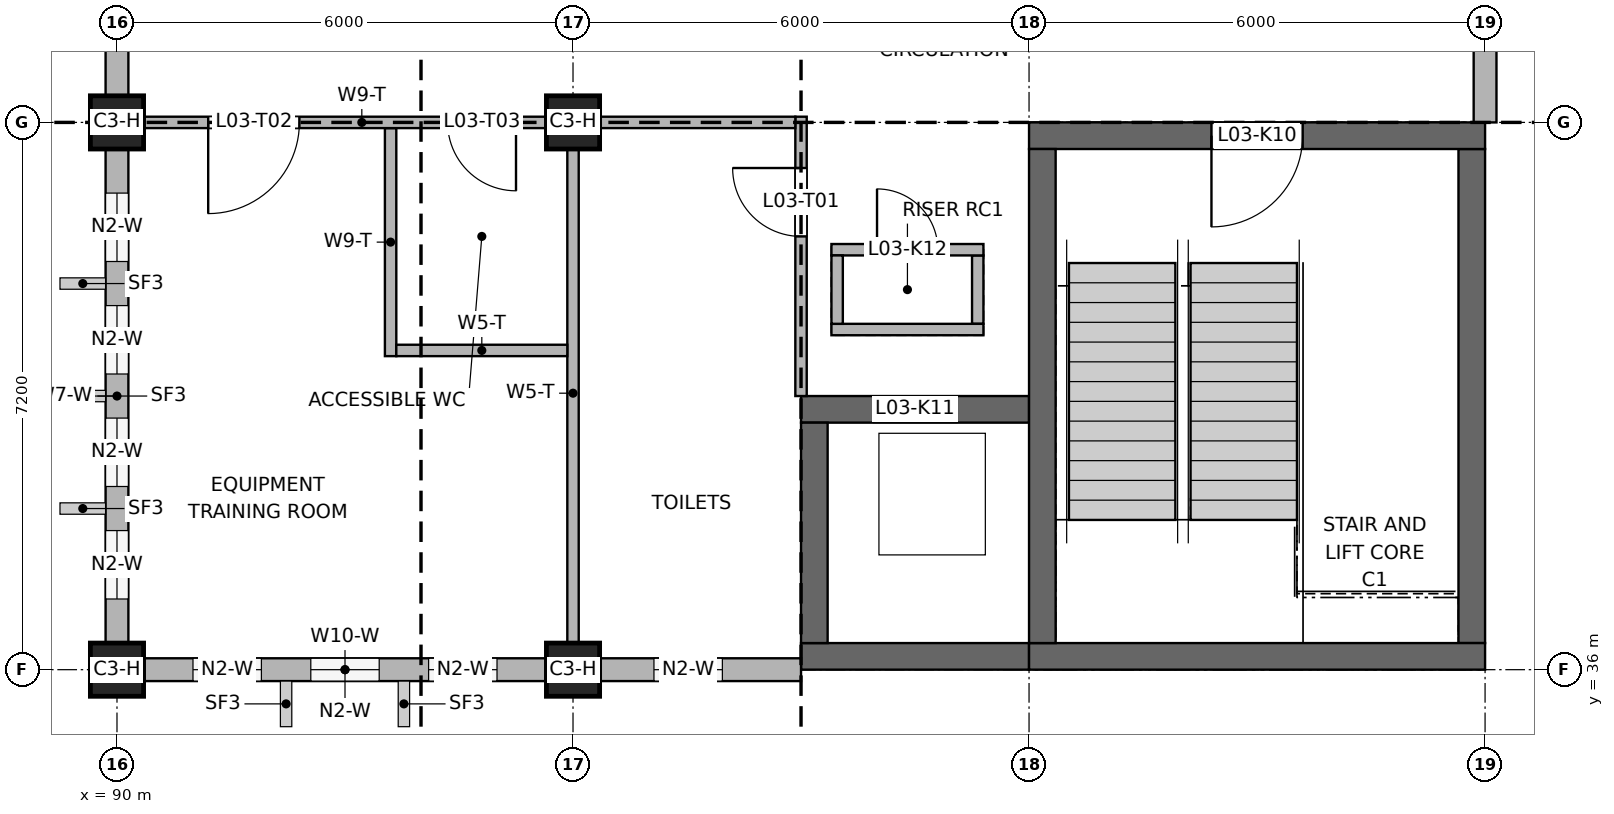
"""IFC4 building model, lengths in metres.
Left out: names, types, materials, properties, quantities, classifications, styles, units other than length and angle.
Written with IfcOpenShell. Run it as: python <this file> out.ifc"""

import sys

from ifc_helpers import new_model, si_unit, direction, frame, frame_2d, origin, origin_2d, place, context, subcontext, project, spatial, rectangle, extrude, element, fill, save


model = new_model("IFC4")
c1 = context("Model", 3, precision=1e-05, world=origin(), true_north=direction((0.0, 1.0)))
c2 = subcontext(c1, "Body", "Model", "MODEL_VIEW")
j1 = project(units=[si_unit("LENGTHUNIT", "METRE"), si_unit("PLANEANGLEUNIT", "RADIAN")], contexts=[c1])
p1 = place(None, origin())
s1 = spatial("IfcSite", under=j1, at=p1, CompositionType="ELEMENT")
p2 = place(p1, origin())
s2 = spatial("IfcBuilding", under=s1, at=p2, CompositionType="ELEMENT")
p3 = place(p2, frame((0.0, 0.0, 12.6)))
s3 = spatial("IfcBuildingStorey", under=s2, at=p3, CompositionType="ELEMENT", Elevation=12.6)
p4 = place(p3, frame((102.0, 36.175, 0.0), z_axis=(0.0, 0.0, 1.0), x_axis=(1.0, 0.0, 0.0)))
e1 = element("IfcWall", 1, at=p4, inside=s3, PredefinedType="SHEAR", context=c2, shape_type="SweptSolid", body=[
    extrude(rectangle(XDim=6.0, YDim=0.35, at=frame_2d((3.0, 0.0))), origin(), (0.0, 0.0, 1.0), 4.0),
])
p5 = place(p3, frame((102.0, 43.025, 0.0), z_axis=(0.0, 0.0, 1.0), x_axis=(1.0, 0.0, 0.0)))
e2 = element("IfcWall", 2, at=p5, inside=s3, PredefinedType="SHEAR", context=c2, shape_type="SweptSolid", body=[
    extrude(rectangle(XDim=6.0, YDim=0.35, at=frame_2d((3.0, 0.0))), origin(), (0.0, 0.0, 1.0), 4.0),
])
p6 = place(p5, frame((2.4, 0.0, 0.0)))
e3 = element("IfcOpeningElement", 3, at=p6, cuts=e2, PredefinedType="OPENING", context=c2, shape_type="SweptSolid", body=[
    extrude(rectangle(XDim=1.2, YDim=2.1, at=frame_2d((0.6, 1.05))), frame((0.0, 0.185, 0.0), z_axis=(0.0, -1.0, 0.0), x_axis=(1.0, 0.0, 0.0)), (0.0, 0.0, 1.0), 0.37),
])
for number, where, z_axis, x_axis in (
    (4, (102.175, 36.35, 0.0), (0.0, 0.0, 1.0), (0.0, 1.0, 0.0)),
    (5, (107.825, 36.35, 0.0), (0.0, 0.0, 1.0), (0.0, 1.0, 0.0)),
):
    element("IfcWall", number, at=place(p3, frame(where, z_axis=z_axis, x_axis=x_axis)), inside=s3, PredefinedType="SHEAR", context=c2, shape_type="SweptSolid", body=[
        extrude(rectangle(XDim=6.5, YDim=0.35, at=frame_2d((3.25, 0.0))), origin(), (0.0, 0.0, 1.0), 4.0),
    ])
p7 = place(p3, frame((99.0, 36.175, 0.0), z_axis=(0.0, 0.0, 1.0), x_axis=(1.0, 0.0, 0.0)))
e6 = element("IfcWall", 6, at=p7, inside=s3, PredefinedType="SHEAR", context=c2, shape_type="SweptSolid", body=[
    extrude(rectangle(XDim=3.0, YDim=0.35, at=frame_2d((1.5, 0.0))), origin(), (0.0, 0.0, 1.0), 4.2),
])
p8 = place(p3, frame((99.0, 39.425, 0.0), z_axis=(0.0, 0.0, 1.0), x_axis=(1.0, 0.0, 0.0)))
e7 = element("IfcWall", 7, at=p8, inside=s3, PredefinedType="SHEAR", context=c2, shape_type="SweptSolid", body=[
    extrude(rectangle(XDim=3.0, YDim=0.35, at=frame_2d((1.5, 0.0))), origin(), (0.0, 0.0, 1.0), 4.2),
])
p9 = place(p8, frame((0.95, 0.0, 0.0)))
e8 = element("IfcOpeningElement", 8, at=p9, cuts=e7, PredefinedType="OPENING", context=c2, shape_type="SweptSolid", body=[
    extrude(rectangle(XDim=1.1, YDim=2.1, at=frame_2d((0.55, 1.05))), frame((0.0, 0.185, 0.0), z_axis=(0.0, -1.0, 0.0), x_axis=(1.0, 0.0, 0.0)), (0.0, 0.0, 1.0), 0.37),
])
p10 = place(p3, frame((99.175, 36.35, 0.0), z_axis=(0.0, 0.0, 1.0), x_axis=(0.0, 1.0, 0.0)))
e9 = element("IfcWall", 9, at=p10, inside=s3, PredefinedType="SHEAR", context=c2, shape_type="SweptSolid", body=[
    extrude(rectangle(XDim=2.9, YDim=0.35, at=frame_2d((1.45, 0.0))), origin(), (0.0, 0.0, 1.0), 4.2),
])
p11 = place(p3, frame((99.4, 40.475, 0.0), z_axis=(0.0, 0.0, 1.0), x_axis=(1.0, 0.0, 0.0)))
e10 = element("IfcWall", 10, at=p11, inside=s3, PredefinedType="SOLIDWALL", context=c2, shape_type="SweptSolid", body=[
    extrude(rectangle(XDim=2.0, YDim=0.15, at=frame_2d((1.0, 0.0))), origin(), (0.0, 0.0, 1.0), 4.2),
])
p12 = place(p3, frame((99.4, 41.525, 0.0), z_axis=(0.0, 0.0, 1.0), x_axis=(1.0, 0.0, 0.0)))
e11 = element("IfcWall", 11, at=p12, inside=s3, PredefinedType="SOLIDWALL", context=c2, shape_type="SweptSolid", body=[
    extrude(rectangle(XDim=2.0, YDim=0.15, at=frame_2d((1.0, 0.0))), origin(), (0.0, 0.0, 1.0), 4.2),
])
p13 = place(p12, frame((0.6, 0.0, 0.0)))
e12 = element("IfcOpeningElement", 12, at=p13, cuts=e11, PredefinedType="OPENING", context=c2, shape_type="SweptSolid", body=[
    extrude(rectangle(XDim=0.8, YDim=2.1, at=frame_2d((0.4, 1.05))), frame((0.0, 0.085, 0.0), z_axis=(0.0, -1.0, 0.0), x_axis=(1.0, 0.0, 0.0)), (0.0, 0.0, 1.0), 0.17),
])
for number, where, z_axis, x_axis in (
    (13, (99.475, 40.55, 0.0), (0.0, 0.0, 1.0), (0.0, 1.0, 0.0)),
    (14, (101.325, 40.55, 0.0), (0.0, 0.0, 1.0), (0.0, 1.0, 0.0)),
):
    element("IfcWall", number, at=place(p3, frame(where, z_axis=z_axis, x_axis=x_axis)), inside=s3, PredefinedType="SOLIDWALL", context=c2, shape_type="SweptSolid", body=[
        extrude(rectangle(XDim=0.9, YDim=0.15, at=frame_2d((0.45, 0.0))), origin(), (0.0, 0.0, 1.0), 4.2),
    ])
for number, where, z_axis, x_axis in (
    (15, (90.0, 36.0, 0.0), (0.0, 0.0, 1.0), (1.0, 0.0, 0.0)),
    (16, (96.0, 36.0, 0.0), (0.0, 0.0, 1.0), (1.0, 0.0, 0.0)),
    (17, (90.0, 43.2, 0.0), (0.0, 0.0, 1.0), (1.0, 0.0, 0.0)),
    (18, (96.0, 43.2, 0.0), (0.0, 0.0, 1.0), (1.0, 0.0, 0.0)),
):
    element("IfcColumn", number, at=place(p3, frame(where, z_axis=z_axis, x_axis=x_axis)), inside=s3, PredefinedType="COLUMN", context=c2, shape_type="SweptSolid", body=[
        extrude(rectangle(XDim=0.7, YDim=0.7, at=origin_2d()), origin(), (0.0, 0.0, 1.0), 4.0),
    ])
p14 = place(p3, frame((90.0, 36.35, 0.0), z_axis=(0.0, 0.0, 1.0), x_axis=(0.0, 1.0, 0.0)))
e19 = element("IfcWall", 19, at=p14, inside=s3, PredefinedType="SOLIDWALL", context=c2, shape_type="SweptSolid", body=[
    extrude(rectangle(XDim=6.5, YDim=0.3, at=frame_2d((3.25, 0.0))), origin(), (0.0, 0.0, 1.0), 3.2),
])
p15 = place(p14, frame((0.58, 0.0, 0.9)))
e20 = element("IfcOpeningElement", 20, at=p15, cuts=e19, PredefinedType="OPENING", context=c2, shape_type="SweptSolid", body=[
    extrude(rectangle(XDim=0.9, YDim=1.2, at=frame_2d((0.45, 0.6))), frame((0.0, 0.16, 0.0), z_axis=(0.0, -1.0, 0.0), x_axis=(1.0, 0.0, 0.0)), (0.0, 0.0, 1.0), 0.32),
])
p16 = place(p14, frame((2.06, 0.0, 0.9)))
e21 = element("IfcOpeningElement", 21, at=p16, cuts=e19, PredefinedType="OPENING", context=c2, shape_type="SweptSolid", body=[
    extrude(rectangle(XDim=0.9, YDim=1.2, at=frame_2d((0.45, 0.6))), frame((0.0, 0.16, 0.0), z_axis=(0.0, -1.0, 0.0), x_axis=(1.0, 0.0, 0.0)), (0.0, 0.0, 1.0), 0.32),
])
p17 = place(p14, frame((3.54, 0.0, 0.9)))
e22 = element("IfcOpeningElement", 22, at=p17, cuts=e19, PredefinedType="OPENING", context=c2, shape_type="SweptSolid", body=[
    extrude(rectangle(XDim=0.9, YDim=1.2, at=frame_2d((0.45, 0.6))), frame((0.0, 0.16, 0.0), z_axis=(0.0, -1.0, 0.0), x_axis=(1.0, 0.0, 0.0)), (0.0, 0.0, 1.0), 0.32),
])
p18 = place(p14, frame((5.02, 0.0, 0.9)))
e23 = element("IfcOpeningElement", 23, at=p18, cuts=e19, PredefinedType="OPENING", context=c2, shape_type="SweptSolid", body=[
    extrude(rectangle(XDim=0.9, YDim=1.2, at=frame_2d((0.45, 0.6))), frame((0.0, 0.16, 0.0), z_axis=(0.0, -1.0, 0.0), x_axis=(1.0, 0.0, 0.0)), (0.0, 0.0, 1.0), 0.32),
])
p19 = place(p3, frame((90.0, 43.55, 0.0), z_axis=(0.0, 0.0, 1.0), x_axis=(0.0, 1.0, 0.0)))
e24 = element("IfcWall", 24, at=p19, inside=s3, PredefinedType="SOLIDWALL", context=c2, shape_type="SweptSolid", body=[
    extrude(rectangle(XDim=6.85, YDim=0.3, at=frame_2d((3.425, 0.0))), origin(), (0.0, 0.0, 1.0), 3.1),
])
p20 = place(p19, frame((2.143, 0.0, 0.9)))
e25 = element("IfcOpeningElement", 25, at=p20, cuts=e24, PredefinedType="OPENING", context=c2, shape_type="SweptSolid", body=[
    extrude(rectangle(XDim=0.9, YDim=1.2, at=frame_2d((0.45, 0.6))), frame((0.0, 0.16, 0.0), z_axis=(0.0, -1.0, 0.0), x_axis=(1.0, 0.0, 0.0)), (0.0, 0.0, 1.0), 0.32),
])
p21 = place(p19, frame((3.457, 0.0, 0.9)))
e26 = element("IfcOpeningElement", 26, at=p21, cuts=e24, PredefinedType="OPENING", context=c2, shape_type="SweptSolid", body=[
    extrude(rectangle(XDim=0.9, YDim=1.2, at=frame_2d((0.45, 0.6))), frame((0.0, 0.16, 0.0), z_axis=(0.0, -1.0, 0.0), x_axis=(1.0, 0.0, 0.0)), (0.0, 0.0, 1.0), 0.32),
])
p22 = place(p3, frame((108.0, 43.2, 0.0), z_axis=(0.0, 0.0, 1.0), x_axis=(0.0, 1.0, 0.0)))
e27 = element("IfcWall", 27, at=p22, inside=s3, PredefinedType="SOLIDWALL", context=c2, shape_type="SweptSolid", body=[
    extrude(rectangle(XDim=6.85, YDim=0.3, at=frame_2d((3.425, 0.0))), origin(), (0.0, 0.0, 1.0), 3.1),
])
p23 = place(p22, frame((2.597, 0.0, 0.9)))
e28 = element("IfcOpeningElement", 28, at=p23, cuts=e27, PredefinedType="OPENING", context=c2, shape_type="SweptSolid", body=[
    extrude(rectangle(XDim=0.9, YDim=1.2, at=frame_2d((0.45, 0.6))), frame((0.0, 0.16, 0.0), z_axis=(0.0, -1.0, 0.0), x_axis=(1.0, 0.0, 0.0)), (0.0, 0.0, 1.0), 0.32),
])
p24 = place(p22, frame((4.015, 0.0, 0.9)))
e29 = element("IfcOpeningElement", 29, at=p24, cuts=e27, PredefinedType="OPENING", context=c2, shape_type="SweptSolid", body=[
    extrude(rectangle(XDim=0.9, YDim=1.2, at=frame_2d((0.45, 0.6))), frame((0.0, 0.16, 0.0), z_axis=(0.0, -1.0, 0.0), x_axis=(1.0, 0.0, 0.0)), (0.0, 0.0, 1.0), 0.32),
])
p25 = place(p22, frame((5.433, 0.0, 0.9)))
e30 = element("IfcOpeningElement", 30, at=p25, cuts=e27, PredefinedType="OPENING", context=c2, shape_type="SweptSolid", body=[
    extrude(rectangle(XDim=0.9, YDim=1.2, at=frame_2d((0.45, 0.6))), frame((0.0, 0.16, 0.0), z_axis=(0.0, -1.0, 0.0), x_axis=(1.0, 0.0, 0.0)), (0.0, 0.0, 1.0), 0.32),
])
p26 = place(p3, frame((90.35, 36.0, 0.0), z_axis=(0.0, 0.0, 1.0), x_axis=(1.0, 0.0, 0.0)))
e31 = element("IfcWall", 31, at=p26, inside=s3, PredefinedType="SOLIDWALL", context=c2, shape_type="SweptSolid", body=[
    extrude(rectangle(XDim=5.3, YDim=0.3, at=frame_2d((2.65, 0.0))), origin(), (0.0, 0.0, 1.0), 3.3),
])
p27 = place(p26, frame((0.65, 0.0, 0.9)))
e32 = element("IfcOpeningElement", 32, at=p27, cuts=e31, PredefinedType="OPENING", context=c2, shape_type="SweptSolid", body=[
    extrude(rectangle(XDim=0.9, YDim=1.2, at=frame_2d((0.45, 0.6))), frame((0.0, 0.16, 0.0), z_axis=(0.0, -1.0, 0.0), x_axis=(1.0, 0.0, 0.0)), (0.0, 0.0, 1.0), 0.32),
])
p28 = place(p26, frame((2.2, 0.0, 0.9)))
e33 = element("IfcOpeningElement", 33, at=p28, cuts=e31, PredefinedType="OPENING", context=c2, shape_type="SweptSolid", body=[
    extrude(rectangle(XDim=0.9, YDim=1.2, at=frame_2d((0.45, 0.6))), frame((0.0, 0.16, 0.0), z_axis=(0.0, -1.0, 0.0), x_axis=(1.0, 0.0, 0.0)), (0.0, 0.0, 1.0), 0.32),
])
p29 = place(p26, frame((3.75, 0.0, 0.9)))
e34 = element("IfcOpeningElement", 34, at=p29, cuts=e31, PredefinedType="OPENING", context=c2, shape_type="SweptSolid", body=[
    extrude(rectangle(XDim=0.9, YDim=1.2, at=frame_2d((0.45, 0.6))), frame((0.0, 0.16, 0.0), z_axis=(0.0, -1.0, 0.0), x_axis=(1.0, 0.0, 0.0)), (0.0, 0.0, 1.0), 0.32),
])
p30 = place(p3, frame((96.35, 36.0, 0.0), z_axis=(0.0, 0.0, 1.0), x_axis=(1.0, 0.0, 0.0)))
e35 = element("IfcWall", 35, at=p30, inside=s3, PredefinedType="SOLIDWALL", context=c2, shape_type="SweptSolid", body=[
    extrude(rectangle(XDim=2.65, YDim=0.3, at=frame_2d((1.325, 0.0))), origin(), (0.0, 0.0, 1.0), 3.3),
])
p31 = place(p30, frame((0.715, 0.0, 0.9)))
e36 = element("IfcOpeningElement", 36, at=p31, cuts=e35, PredefinedType="OPENING", context=c2, shape_type="SweptSolid", body=[
    extrude(rectangle(XDim=0.9, YDim=1.2, at=frame_2d((0.45, 0.6))), frame((0.0, 0.16, 0.0), z_axis=(0.0, -1.0, 0.0), x_axis=(1.0, 0.0, 0.0)), (0.0, 0.0, 1.0), 0.32),
])
p32 = place(p3, frame((93.6, 40.125, 0.0), z_axis=(0.0, 0.0, 1.0), x_axis=(0.0, 1.0, 0.0)))
e37 = element("IfcWall", 37, at=p32, inside=s3, PredefinedType="PARTITIONING", context=c2, shape_type="SweptSolid", body=[
    extrude(rectangle(XDim=3.0, YDim=0.15, at=frame_2d((1.5, 0.0))), origin(), (0.0, 0.0, 1.0), 3.3),
])
p33 = place(p3, frame((96.0, 36.15, 0.0), z_axis=(0.0, 0.0, 1.0), x_axis=(0.0, 1.0, 0.0)))
e38 = element("IfcWall", 38, at=p33, inside=s3, PredefinedType="PARTITIONING", context=c2, shape_type="SweptSolid", body=[
    extrude(rectangle(XDim=6.975, YDim=0.15, at=frame_2d((3.488, 0.0))), origin(), (0.0, 0.0, 1.0), 3.2),
])
p34 = place(p3, frame((99.0, 39.6, 0.0), z_axis=(0.0, 0.0, 1.0), x_axis=(0.0, 1.0, 0.0)))
e39 = element("IfcWall", 39, at=p34, inside=s3, PredefinedType="PARTITIONING", context=c2, shape_type="SweptSolid", body=[
    extrude(rectangle(XDim=3.675, YDim=0.15, at=frame_2d((1.837, 0.0))), origin(), (0.0, 0.0, 1.0), 4.0),
])
p35 = place(p34, frame((2.1, 0.0, 0.0)))
e40 = element("IfcOpeningElement", 40, at=p35, cuts=e39, PredefinedType="OPENING", context=c2, shape_type="SweptSolid", body=[
    extrude(rectangle(XDim=0.9, YDim=2.1, at=frame_2d((0.45, 1.05))), frame((0.0, 0.085, 0.0), z_axis=(0.0, -1.0, 0.0), x_axis=(1.0, 0.0, 0.0)), (0.0, 0.0, 1.0), 0.17),
])
p36 = place(p3, frame((93.675, 40.2, 0.0), z_axis=(0.0, 0.0, 1.0), x_axis=(1.0, 0.0, 0.0)))
e41 = element("IfcWall", 41, at=p36, inside=s3, PredefinedType="PARTITIONING", context=c2, shape_type="SweptSolid", body=[
    extrude(rectangle(XDim=2.25, YDim=0.15, at=frame_2d((1.125, 0.0))), origin(), (0.0, 0.0, 1.0), 3.2),
])
p37 = place(p3, frame((90.15, 43.2, 0.0), z_axis=(0.0, 0.0, 1.0), x_axis=(1.0, 0.0, 0.0)))
e42 = element("IfcWall", 42, at=p37, inside=s3, PredefinedType="PARTITIONING", context=c2, shape_type="SweptSolid", body=[
    extrude(rectangle(XDim=8.775, YDim=0.15, at=frame_2d((4.388, 0.0))), origin(), (0.0, 0.0, 1.0), 3.3),
])
p38 = place(p37, frame((1.05, 0.0, 0.0)))
e43 = element("IfcOpeningElement", 43, at=p38, cuts=e42, PredefinedType="OPENING", context=c2, shape_type="SweptSolid", body=[
    extrude(rectangle(XDim=1.2, YDim=2.1, at=frame_2d((0.6, 1.05))), frame((0.0, 0.085, 0.0), z_axis=(0.0, -1.0, 0.0), x_axis=(1.0, 0.0, 0.0)), (0.0, 0.0, 1.0), 0.17),
])
p39 = place(p37, frame((4.2, 0.0, 0.0)))
e44 = element("IfcOpeningElement", 44, at=p39, cuts=e42, PredefinedType="OPENING", context=c2, shape_type="SweptSolid", body=[
    extrude(rectangle(XDim=0.9, YDim=2.1, at=frame_2d((0.45, 1.05))), frame((0.0, 0.085, 0.0), z_axis=(0.0, -1.0, 0.0), x_axis=(1.0, 0.0, 0.0)), (0.0, 0.0, 1.0), 0.17),
])
p40 = place(p15, origin())
e45 = element("IfcWindow", 45, at=p40, inside=s3, PartitioningType="SINGLE_PANEL", PredefinedType="WINDOW", context=c2, shape_type="SweptSolid", body=[
    extrude(rectangle(XDim=0.9, YDim=1.2, at=frame_2d((0.45, 0.6))), frame((0.0, 0.03, 0.0), z_axis=(0.0, -1.0, 0.0), x_axis=(1.0, 0.0, 0.0)), (0.0, 0.0, 1.0), 0.06),
])
fill(e20, e45)
p41 = place(p16, origin())
e46 = element("IfcWindow", 46, at=p41, inside=s3, PartitioningType="SINGLE_PANEL", PredefinedType="WINDOW", context=c2, shape_type="SweptSolid", body=[
    extrude(rectangle(XDim=0.9, YDim=1.2, at=frame_2d((0.45, 0.6))), frame((0.0, 0.03, 0.0), z_axis=(0.0, -1.0, 0.0), x_axis=(1.0, 0.0, 0.0)), (0.0, 0.0, 1.0), 0.06),
])
fill(e21, e46)
p42 = place(p17, origin())
e47 = element("IfcWindow", 47, at=p42, inside=s3, PartitioningType="SINGLE_PANEL", PredefinedType="WINDOW", context=c2, shape_type="SweptSolid", body=[
    extrude(rectangle(XDim=0.9, YDim=1.2, at=frame_2d((0.45, 0.6))), frame((0.0, 0.03, 0.0), z_axis=(0.0, -1.0, 0.0), x_axis=(1.0, 0.0, 0.0)), (0.0, 0.0, 1.0), 0.06),
])
fill(e22, e47)
p43 = place(p18, origin())
e48 = element("IfcWindow", 48, at=p43, inside=s3, PartitioningType="SINGLE_PANEL", PredefinedType="WINDOW", context=c2, shape_type="SweptSolid", body=[
    extrude(rectangle(XDim=0.9, YDim=1.2, at=frame_2d((0.45, 0.6))), frame((0.0, 0.03, 0.0), z_axis=(0.0, -1.0, 0.0), x_axis=(1.0, 0.0, 0.0)), (0.0, 0.0, 1.0), 0.06),
])
fill(e23, e48)
p44 = place(p27, origin())
e49 = element("IfcWindow", 49, at=p44, inside=s3, PartitioningType="SINGLE_PANEL", PredefinedType="WINDOW", context=c2, shape_type="SweptSolid", body=[
    extrude(rectangle(XDim=0.9, YDim=1.2, at=frame_2d((0.45, 0.6))), frame((0.0, 0.03, 0.0), z_axis=(0.0, -1.0, 0.0), x_axis=(1.0, 0.0, 0.0)), (0.0, 0.0, 1.0), 0.06),
])
fill(e32, e49)
p45 = place(p28, origin())
e50 = element("IfcWindow", 50, at=p45, inside=s3, PartitioningType="SINGLE_PANEL", PredefinedType="WINDOW", context=c2, shape_type="SweptSolid", body=[
    extrude(rectangle(XDim=0.9, YDim=1.2, at=frame_2d((0.45, 0.6))), frame((0.0, 0.03, 0.0), z_axis=(0.0, -1.0, 0.0), x_axis=(1.0, 0.0, 0.0)), (0.0, 0.0, 1.0), 0.06),
])
fill(e33, e50)
p46 = place(p29, origin())
e51 = element("IfcWindow", 51, at=p46, inside=s3, PartitioningType="SINGLE_PANEL", PredefinedType="WINDOW", context=c2, shape_type="SweptSolid", body=[
    extrude(rectangle(XDim=0.9, YDim=1.2, at=frame_2d((0.45, 0.6))), frame((0.0, 0.03, 0.0), z_axis=(0.0, -1.0, 0.0), x_axis=(1.0, 0.0, 0.0)), (0.0, 0.0, 1.0), 0.06),
])
fill(e34, e51)
p47 = place(p31, origin())
e52 = element("IfcWindow", 52, at=p47, inside=s3, PartitioningType="SINGLE_PANEL", PredefinedType="WINDOW", context=c2, shape_type="SweptSolid", body=[
    extrude(rectangle(XDim=0.9, YDim=1.2, at=frame_2d((0.45, 0.6))), frame((0.0, 0.03, 0.0), z_axis=(0.0, -1.0, 0.0), x_axis=(1.0, 0.0, 0.0)), (0.0, 0.0, 1.0), 0.06),
])
fill(e36, e52)
p48 = place(p6, frame((1.2, 0.0, 0.0), z_axis=(0.0, 0.0, 1.0), x_axis=(-1.0, 0.0, 0.0)))
e53 = element("IfcDoor", 53, at=p48, inside=s3, OperationType="SINGLE_SWING_RIGHT", PredefinedType="DOOR", context=c2, shape_type="SweptSolid", body=[
    extrude(rectangle(XDim=1.2, YDim=2.1, at=frame_2d((0.6, 1.05))), frame((0.0, 0.025, 0.0), z_axis=(0.0, -1.0, 0.0), x_axis=(1.0, 0.0, 0.0)), (0.0, 0.0, 1.0), 0.05),
])
fill(e3, e53)
p49 = place(p9, origin())
e54 = element("IfcDoor", 54, at=p49, inside=s3, OperationType="DOUBLE_DOOR_SLIDING", PredefinedType="DOOR", context=c2, shape_type="SweptSolid", body=[
    extrude(rectangle(XDim=1.1, YDim=2.1, at=frame_2d((0.55, 1.05))), frame((0.0, 0.025, 0.0), z_axis=(0.0, -1.0, 0.0), x_axis=(1.0, 0.0, 0.0)), (0.0, 0.0, 1.0), 0.05),
])
fill(e8, e54)
p50 = place(p13, origin())
e55 = element("IfcDoor", 55, at=p50, inside=s3, OperationType="SINGLE_SWING_LEFT", PredefinedType="DOOR", context=c2, shape_type="SweptSolid", body=[
    extrude(rectangle(XDim=0.8, YDim=2.1, at=frame_2d((0.4, 1.05))), frame((0.0, 0.025, 0.0), z_axis=(0.0, -1.0, 0.0), x_axis=(1.0, 0.0, 0.0)), (0.0, 0.0, 1.0), 0.05),
])
fill(e12, e55)
p51 = place(p35, origin())
e56 = element("IfcDoor", 56, at=p51, inside=s3, OperationType="SINGLE_SWING_RIGHT", PredefinedType="DOOR", context=c2, shape_type="SweptSolid", body=[
    extrude(rectangle(XDim=0.9, YDim=2.1, at=frame_2d((0.45, 1.05))), frame((0.0, 0.025, 0.0), z_axis=(0.0, -1.0, 0.0), x_axis=(1.0, 0.0, 0.0)), (0.0, 0.0, 1.0), 0.05),
])
fill(e40, e56)
p52 = place(p38, frame((1.2, 0.0, 0.0), z_axis=(0.0, 0.0, 1.0), x_axis=(-1.0, 0.0, 0.0)))
e57 = element("IfcDoor", 57, at=p52, inside=s3, OperationType="SINGLE_SWING_RIGHT", PredefinedType="DOOR", context=c2, shape_type="SweptSolid", body=[
    extrude(rectangle(XDim=1.2, YDim=2.1, at=frame_2d((0.6, 1.05))), frame((0.0, 0.025, 0.0), z_axis=(0.0, -1.0, 0.0), x_axis=(1.0, 0.0, 0.0)), (0.0, 0.0, 1.0), 0.05),
])
fill(e43, e57)
p53 = place(p39, frame((0.9, 0.0, 0.0), z_axis=(0.0, 0.0, 1.0), x_axis=(-1.0, 0.0, 0.0)))
e58 = element("IfcDoor", 58, at=p53, inside=s3, OperationType="SINGLE_SWING_LEFT", PredefinedType="DOOR", context=c2, shape_type="SweptSolid", body=[
    extrude(rectangle(XDim=0.9, YDim=2.1, at=frame_2d((0.45, 1.05))), frame((0.0, 0.025, 0.0), z_axis=(0.0, -1.0, 0.0), x_axis=(1.0, 0.0, 0.0)), (0.0, 0.0, 1.0), 0.05),
])
fill(e44, e58)
save(model, sys.argv[1])
